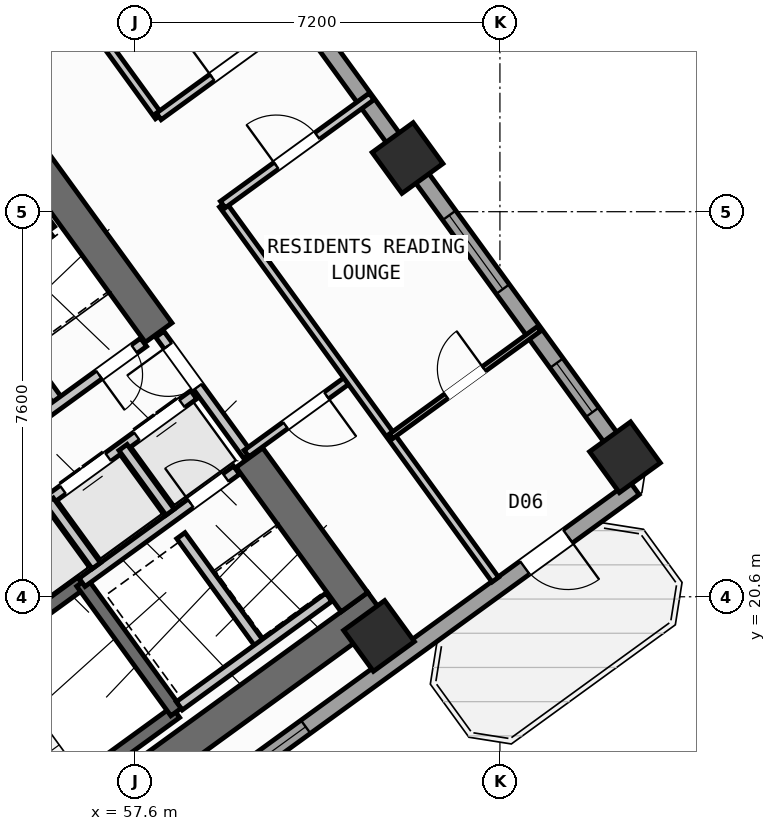
"""IFC4 building model, lengths in metres.
Left out: names, types, materials, properties, quantities, classifications, styles, units other than length and angle.
Written with IfcOpenShell. Run it as: python <this file> out.ifc"""

import sys

from ifc_helpers import new_model, si_unit, direction, frame, frame_2d, origin, origin_2d, place, context, subcontext, project, spatial, rectangle, hollow_rectangle, extrude, source, transform, mapped, element, fill, save


model = new_model("IFC4")
c1 = context("Model", 3, precision=1e-05, world=origin(), true_north=direction((0.0, 1.0)))
c2 = subcontext(c1, "Body", "Model", "MODEL_VIEW")
j1 = project(units=[si_unit("LENGTHUNIT", "METRE"), si_unit("PLANEANGLEUNIT", "RADIAN")], contexts=[c1])
p1 = place(None, origin())
s1 = spatial("IfcSite", under=j1, at=p1, CompositionType="ELEMENT")
p2 = place(p1, origin())
s2 = spatial("IfcBuilding", under=s1, at=p2, CompositionType="ELEMENT")
p3 = place(p2, frame((0.0, 0.0, 71.7)))
s3 = spatial("IfcBuildingStorey", under=s2, at=p3, CompositionType="ELEMENT", Elevation=71.7)
p4 = place(p3, frame((52.318, 13.11, 0.0), z_axis=(0.0, 0.0, 1.0), x_axis=(0.809019445368, 0.587781878776, 0.0)))
e1 = element("IfcWall", 1, at=p4, inside=s3, PredefinedType="SHEAR", context=c2, shape_type="SweptSolid", body=[
    extrude(rectangle(XDim=12.44, YDim=0.65, at=frame_2d((6.22, 0.0))), origin(), (0.0, 0.0, 1.0), 4.52),
])
p5 = place(p3, frame((61.929, 20.494, 0.0), z_axis=(0.0, 0.0, 1.0), x_axis=(-0.58782982593, 0.808984607855, 0.0)))
e2 = element("IfcWall", 2, at=p5, inside=s3, PredefinedType="SHEAR", context=c2, shape_type="SweptSolid", body=[
    extrude(rectangle(XDim=3.525, YDim=0.65, at=frame_2d((1.762, 0.0))), origin(), (0.0, 0.0, 1.0), 4.52),
])
p6 = place(p3, frame((58.064, 25.813, 0.0), z_axis=(0.0, 0.0, 1.0), x_axis=(-0.58777996584, 0.809020835181, 0.0)))
e3 = element("IfcWall", 3, at=p6, inside=s3, PredefinedType="SHEAR", context=c2, shape_type="SweptSolid", body=[
    extrude(rectangle(XDim=6.375, YDim=0.65, at=frame_2d((3.188, 0.0))), origin(), (0.0, 0.0, 1.0), 4.52),
])
m1 = source(origin(), c2, "Body", "SweptSolid", [
    extrude(hollow_rectangle(XDim=1.0, YDim=1.0, WallThickness=0.04, at=origin_2d()), origin(), (0.0, 0.0, 1.0), 4.8),
])
for number, where, z_axis, x_axis in (
    (4, (62.414, 19.827, 0.0), (0.0, 0.0, 1.0), (0.809, 0.588, 0.0)),
    (5, (67.268, 23.354, 0.0), (0.0, 0.0, 1.0), (0.809, 0.588, 0.0)),
    (6, (62.977, 29.259, 0.0), (0.0, 0.0, 1.0), (0.809, 0.588, 0.0)),
):
    element("IfcColumn", number, at=place(p3, frame(where, z_axis=z_axis, x_axis=x_axis)), inside=s3, PredefinedType="COLUMN", context=c2, shape_type="MappedRepresentation", body=[
        mapped(m1, transform((0.0, 0.0, 0.0), scale=1.0)),
    ])
p7 = place(p3, frame((54.81, 40.5, 0.0), z_axis=(0.0, 0.0, 1.0), x_axis=(0.587783625747, -0.809018176127, 0.0)))
e7 = element("IfcWall", 7, at=p7, inside=s3, PredefinedType="STANDARD", context=c2, shape_type="SweptSolid", body=[
    extrude(rectangle(XDim=21.587, YDim=0.32, at=frame_2d((10.794, 0.0))), origin(), (0.0, 0.0, 1.0), 3.895),
])
p8 = place(p7, frame((7.729, 0.0, 0.85)))
e8 = element("IfcOpeningElement", 8, at=p8, cuts=e7, PredefinedType="OPENING", context=c2, shape_type="SweptSolid", body=[
    extrude(rectangle(XDim=1.8, YDim=1.5, at=frame_2d((0.9, 0.75))), frame((0.0, 0.17, 0.0), z_axis=(0.0, -1.0, 0.0), x_axis=(1.0, 0.0, 0.0)), (0.0, 0.0, 1.0), 0.34),
])
p9 = place(p7, frame((15.292, 0.0, 0.85)))
e9 = element("IfcOpeningElement", 9, at=p9, cuts=e7, PredefinedType="OPENING", context=c2, shape_type="SweptSolid", body=[
    extrude(rectangle(XDim=1.8, YDim=1.5, at=frame_2d((0.9, 0.75))), frame((0.0, 0.17, 0.0), z_axis=(0.0, -1.0, 0.0), x_axis=(1.0, 0.0, 0.0)), (0.0, 0.0, 1.0), 0.34),
])
p10 = place(p7, frame((18.897, 0.0, 0.95)))
e10 = element("IfcOpeningElement", 10, at=p10, cuts=e7, PredefinedType="OPENING", context=c2, shape_type="SweptSolid", body=[
    extrude(rectangle(XDim=1.2, YDim=1.4, at=frame_2d((0.6, 0.7))), frame((0.0, 0.17, 0.0), z_axis=(0.0, -1.0, 0.0), x_axis=(1.0, 0.0, 0.0)), (0.0, 0.0, 1.0), 0.34),
])
p11 = place(p3, frame((67.454, 22.747, 0.0), z_axis=(0.0, 0.0, 1.0), x_axis=(-0.809021120468, -0.587779573171, 0.0)))
e11 = element("IfcWall", 11, at=p11, inside=s3, PredefinedType="STANDARD", context=c2, shape_type="SweptSolid", body=[
    extrude(rectangle(XDim=17.588, YDim=0.32, at=frame_2d((8.794, 0.0))), origin(), (0.0, 0.0, 1.0), 4.52),
])
p12 = place(p11, frame((1.624, 0.0, 0.0)))
e12 = element("IfcOpeningElement", 12, at=p12, cuts=e11, PredefinedType="OPENING", context=c2, shape_type="SweptSolid", body=[
    extrude(rectangle(XDim=1.05, YDim=2.15, at=frame_2d((0.525, 1.075))), frame((0.0, 0.17, 0.0), z_axis=(0.0, -1.0, 0.0), x_axis=(1.0, 0.0, 0.0)), (0.0, 0.0, 1.0), 0.34),
])
p13 = place(p11, frame((8.019, 0.0, 0.75)))
e13 = element("IfcOpeningElement", 13, at=p13, cuts=e11, PredefinedType="OPENING", context=c2, shape_type="SweptSolid", body=[
    extrude(rectangle(XDim=2.4, YDim=1.6, at=frame_2d((1.2, 0.8))), frame((0.0, 0.17, 0.0), z_axis=(0.0, -1.0, 0.0), x_axis=(1.0, 0.0, 0.0)), (0.0, 0.0, 1.0), 0.34),
])
p14 = place(p11, frame((13.169, 0.0, 0.75)))
e14 = element("IfcOpeningElement", 14, at=p14, cuts=e11, PredefinedType="OPENING", context=c2, shape_type="SweptSolid", body=[
    extrude(rectangle(XDim=2.4, YDim=1.6, at=frame_2d((1.2, 0.8))), frame((0.0, 0.17, 0.0), z_axis=(0.0, -1.0, 0.0), x_axis=(1.0, 0.0, 0.0)), (0.0, 0.0, 1.0), 0.34),
])
p15 = place(p3, frame((49.863, 23.44, 0.0), z_axis=(0.0, 0.0, 1.0), x_axis=(0.809003474932, 0.587803859759, 0.0)))
e15 = element("IfcWall", 15, at=p15, inside=s3, PredefinedType="SHEAR", context=c2, shape_type="SweptSolid", body=[
    extrude(rectangle(XDim=7.46, YDim=0.26, at=frame_2d((3.73, 0.0))), origin(), (0.0, 0.0, 1.0), 4.52),
])
p16 = place(p15, frame((0.36, 0.0, 0.0)))
e16 = element("IfcOpeningElement", 16, at=p16, cuts=e15, PredefinedType="OPENING", context=c2, shape_type="SweptSolid", body=[
    extrude(rectangle(XDim=0.86, YDim=2.05, at=frame_2d((0.43, 1.025))), frame((0.0, 0.14, 0.0), z_axis=(0.0, -1.0, 0.0), x_axis=(1.0, 0.0, 0.0)), (0.0, 0.0, 1.0), 0.28),
])
p17 = place(p3, frame((55.906, 27.831, 0.0), z_axis=(0.0, 0.0, 1.0), x_axis=(-0.587804123638, 0.809003283204, 0.0)))
e17 = element("IfcWall", 17, at=p17, inside=s3, PredefinedType="SHEAR", context=c2, shape_type="SweptSolid", body=[
    extrude(rectangle(XDim=3.16, YDim=0.26, at=frame_2d((1.58, 0.0))), origin(), (0.0, 0.0, 1.0), 4.52),
])
p18 = place(p3, frame((52.472, 14.013, 0.0), z_axis=(0.0, 0.0, 1.0), x_axis=(0.809028366311, 0.587769599847, 0.0)))
e18 = element("IfcWall", 18, at=p18, inside=s3, PredefinedType="SHEAR", context=c2, shape_type="SweptSolid", body=[
    extrude(rectangle(XDim=7.33, YDim=0.26, at=frame_2d((3.665, 0.0))), origin(), (0.0, 0.0, 1.0), 4.52),
])
p19 = place(p3, frame((50.615, 16.57, 0.0), z_axis=(0.0, 0.0, 1.0), x_axis=(0.809028366311, 0.587769599847, 0.0)))
e19 = element("IfcWall", 19, at=p19, inside=s3, PredefinedType="SHEAR", context=c2, shape_type="SweptSolid", body=[
    extrude(rectangle(XDim=7.33, YDim=0.26, at=frame_2d((3.665, 0.0))), origin(), (0.0, 0.0, 1.0), 4.52),
])
p20 = place(p19, frame((0.22, 0.0, 0.0)))
e20 = element("IfcOpeningElement", 20, at=p20, cuts=e19, PredefinedType="OPENING", context=c2, shape_type="SweptSolid", body=[
    extrude(rectangle(XDim=1.1, YDim=2.1, at=frame_2d((0.55, 1.05))), frame((0.0, 0.14, 0.0), z_axis=(0.0, -1.0, 0.0), x_axis=(1.0, 0.0, 0.0)), (0.0, 0.0, 1.0), 0.28),
])
p21 = place(p3, frame((58.41, 18.327, 0.0), z_axis=(0.0, 0.0, 1.0), x_axis=(-0.58776738483, 0.809029975545, 0.0)))
e21 = element("IfcWall", 21, at=p21, inside=s3, PredefinedType="SHEAR", context=c2, shape_type="SweptSolid", body=[
    extrude(rectangle(XDim=3.16, YDim=0.26, at=frame_2d((1.58, 0.0))), origin(), (0.0, 0.0, 1.0), 4.52),
])
p22 = place(p3, frame((56.553, 20.884, 0.0), z_axis=(0.0, 0.0, 1.0), x_axis=(0.809035789462, 0.587759382205, 0.0)))
e22 = element("IfcWall", 22, at=p22, inside=s3, PredefinedType="STANDARD", context=c2, shape_type="SweptSolid", body=[
    extrude(rectangle(XDim=3.768, YDim=0.2, at=frame_2d((1.884, 0.0))), origin(), (0.0, 0.0, 1.0), 4.51),
])
p23 = place(p22, frame((2.65, 0.0, 0.0)))
e23 = element("IfcOpeningElement", 23, at=p23, cuts=e22, PredefinedType="OPENING", context=c2, shape_type="SweptSolid", body=[
    extrude(rectangle(XDim=0.86, YDim=2.05, at=frame_2d((0.43, 1.025))), frame((0.0, 0.11, 0.0), z_axis=(0.0, -1.0, 0.0), x_axis=(1.0, 0.0, 0.0)), (0.0, 0.0, 1.0), 0.22),
])
p24 = place(p3, frame((54.421, 21.436, 0.0), z_axis=(0.0, 0.0, 1.0), x_axis=(0.809013710463, 0.587789772183, 0.0)))
e24 = element("IfcWall", 24, at=p24, inside=s3, PredefinedType="STANDARD", context=c2, shape_type="SweptSolid", body=[
    extrude(rectangle(XDim=5.36, YDim=0.2, at=frame_2d((2.68, 0.0))), origin(), (0.0, 0.0, 1.0), 4.51),
])
p25 = place(p24, frame((0.37, 0.0, 0.0)))
e25 = element("IfcOpeningElement", 25, at=p25, cuts=e24, PredefinedType="OPENING", context=c2, shape_type="SweptSolid", body=[
    extrude(rectangle(XDim=1.1, YDim=2.15, at=frame_2d((0.55, 1.075))), frame((0.0, 0.11, 0.0), z_axis=(0.0, -1.0, 0.0), x_axis=(1.0, 0.0, 0.0)), (0.0, 0.0, 1.0), 0.22),
])
p26 = place(p24, frame((2.17, 0.0, 0.0)))
e26 = element("IfcOpeningElement", 26, at=p26, cuts=e24, PredefinedType="OPENING", context=c2, shape_type="SweptSolid", body=[
    extrude(rectangle(XDim=1.1, YDim=2.15, at=frame_2d((0.55, 1.075))), frame((0.0, 0.11, 0.0), z_axis=(0.0, -1.0, 0.0), x_axis=(1.0, 0.0, 0.0)), (0.0, 0.0, 1.0), 0.22),
])
p27 = place(p24, frame((3.97, 0.0, 0.0)))
e27 = element("IfcOpeningElement", 27, at=p27, cuts=e24, PredefinedType="OPENING", context=c2, shape_type="SweptSolid", body=[
    extrude(rectangle(XDim=1.1, YDim=2.15, at=frame_2d((0.55, 1.075))), frame((0.0, 0.11, 0.0), z_axis=(0.0, -1.0, 0.0), x_axis=(1.0, 0.0, 0.0)), (0.0, 0.0, 1.0), 0.22),
])
p28 = place(p3, frame((56.834, 21.212, 0.0), z_axis=(0.0, 0.0, 1.0), x_axis=(-0.58776738483, 0.809029975545, 0.0)))
e28 = element("IfcWall", 28, at=p28, inside=s3, PredefinedType="STANDARD", context=c2, shape_type="SweptSolid", body=[
    extrude(rectangle(XDim=1.58, YDim=0.2, at=frame_2d((0.79, 0.0))), origin(), (0.0, 0.0, 1.0), 4.51),
])
p29 = place(p3, frame((58.29, 22.27, 0.0), z_axis=(0.0, 0.0, 1.0), x_axis=(-0.587840865826, 0.808976585857, 0.0)))
e29 = element("IfcWall", 29, at=p29, inside=s3, PredefinedType="STANDARD", context=c2, shape_type="SweptSolid", body=[
    extrude(rectangle(XDim=1.58, YDim=0.2, at=frame_2d((0.79, 0.0))), origin(), (0.0, 0.0, 1.0), 4.51),
])
p30 = place(p3, frame((60.067, 19.655, 0.0), z_axis=(0.0, 0.0, 1.0), x_axis=(-0.587800520745, 0.809005900975, 0.0)))
e30 = element("IfcWall", 30, at=p30, inside=s3, PredefinedType="STANDARD", context=c2, shape_type="SweptSolid", body=[
    extrude(rectangle(XDim=2.66, YDim=0.2, at=frame_2d((1.33, 0.0))), origin(), (0.0, 0.0, 1.0), 4.51),
])
p31 = place(p3, frame((58.472, 18.447, 0.0), z_axis=(0.0, 0.0, 1.0), x_axis=(0.809022487728, 0.587777691266, 0.0)))
e31 = element("IfcWall", 31, at=p31, inside=s3, PredefinedType="STANDARD", context=c2, shape_type="SweptSolid", body=[
    extrude(rectangle(XDim=3.648, YDim=0.2, at=frame_2d((1.824, 0.0))), origin(), (0.0, 0.0, 1.0), 4.51),
])
p32 = place(p3, frame((56.111, 24.419, 0.0), z_axis=(0.0, 0.0, 1.0), x_axis=(-0.58777848983, 0.809021907548, 0.0)))
e32 = element("IfcWall", 32, at=p32, inside=s3, PredefinedType="STANDARD", context=c2, shape_type="SweptSolid", body=[
    extrude(rectangle(XDim=2.88, YDim=0.2, at=frame_2d((1.44, 0.0))), origin(), (0.0, 0.0, 1.0), 4.51),
])
p33 = place(p3, frame((53.425, 22.468, 0.0), z_axis=(0.0, 0.0, 1.0), x_axis=(0.80902705128, 0.587771409902, 0.0)))
e33 = element("IfcWall", 33, at=p33, inside=s3, PredefinedType="STANDARD", context=c2, shape_type="SweptSolid", body=[
    extrude(rectangle(XDim=5.368, YDim=0.2, at=frame_2d((2.684, 0.0))), origin(), (0.0, 0.0, 1.0), 4.51),
])
p34 = place(p33, frame((4.28, 0.0, 0.0)))
e34 = element("IfcOpeningElement", 34, at=p34, cuts=e33, PredefinedType="OPENING", context=c2, shape_type="SweptSolid", body=[
    extrude(rectangle(XDim=0.86, YDim=2.05, at=frame_2d((0.43, 1.025))), frame((0.0, 0.11, 0.0), z_axis=(0.0, -1.0, 0.0), x_axis=(1.0, 0.0, 0.0)), (0.0, 0.0, 1.0), 0.22),
])
p35 = place(p33, frame((1.45, 0.0, 0.0)))
e35 = element("IfcOpeningElement", 35, at=p35, cuts=e33, PredefinedType="OPENING", context=c2, shape_type="SweptSolid", body=[
    extrude(rectangle(XDim=0.86, YDim=2.05, at=frame_2d((0.43, 1.025))), frame((0.0, 0.11, 0.0), z_axis=(0.0, -1.0, 0.0), x_axis=(1.0, 0.0, 0.0)), (0.0, 0.0, 1.0), 0.22),
])
p36 = place(p3, frame((59.827, 23.386, 0.0), z_axis=(0.0, 0.0, 1.0), x_axis=(-0.587803840107, 0.809003489211, 0.0)))
e36 = element("IfcWall", 36, at=p36, inside=s3, PredefinedType="STANDARD", context=c2, shape_type="SweptSolid", body=[
    extrude(rectangle(XDim=2.96, YDim=0.2, at=frame_2d((1.48, 0.0))), origin(), (0.0, 0.0, 1.0), 4.51),
])
p37 = place(p36, frame((1.68, 0.0, 0.0)))
e37 = element("IfcOpeningElement", 37, at=p37, cuts=e36, PredefinedType="OPENING", context=c2, shape_type="SweptSolid", body=[
    extrude(rectangle(XDim=1.0, YDim=2.1, at=frame_2d((0.5, 1.05))), frame((0.0, 0.11, 0.0), z_axis=(0.0, -1.0, 0.0), x_axis=(1.0, 0.0, 0.0)), (0.0, 0.0, 1.0), 0.22),
])
p38 = place(p3, frame((59.798, 23.427, 0.0), z_axis=(0.0, 0.0, 1.0), x_axis=(0.809034604122, 0.587761013791, 0.0)))
e38 = element("IfcWall", 38, at=p38, inside=s3, PredefinedType="PARTITIONING", context=c2, shape_type="SweptSolid", body=[
    extrude(rectangle(XDim=2.51, YDim=0.16, at=frame_2d((1.255, 0.0))), origin(), (0.0, 0.0, 1.0), 4.51),
])
p39 = place(p38, frame((0.95, 0.0, 0.0)))
e39 = element("IfcOpeningElement", 39, at=p39, cuts=e38, PredefinedType="OPENING", context=c2, shape_type="SweptSolid", body=[
    extrude(rectangle(XDim=1.0, YDim=2.1, at=frame_2d((0.5, 1.05))), frame((0.0, 0.09, 0.0), z_axis=(0.0, -1.0, 0.0), x_axis=(1.0, 0.0, 0.0)), (0.0, 0.0, 1.0), 0.18),
])
p40 = place(p3, frame((64.709, 20.938, 0.0), z_axis=(0.0, 0.0, 1.0), x_axis=(-0.587776590479, 0.80902328748, 0.0)))
e40 = element("IfcWall", 40, at=p40, inside=s3, PredefinedType="PARTITIONING", context=c2, shape_type="SweptSolid", body=[
    extrude(rectangle(XDim=9.15, YDim=0.16, at=frame_2d((4.575, 0.0))), origin(), (0.0, 0.0, 1.0), 4.51),
])
p41 = place(p3, frame((58.067, 30.08, 0.0), z_axis=(0.0, 0.0, 1.0), x_axis=(-0.587787785243, 0.809015154073, 0.0)))
e41 = element("IfcWall", 41, at=p41, inside=s3, PredefinedType="PARTITIONING", context=c2, shape_type="SweptSolid", body=[
    extrude(rectangle(XDim=10.4, YDim=0.16, at=frame_2d((5.2, 0.0))), origin(), (0.0, 0.0, 1.0), 4.51),
])
p42 = place(p3, frame((59.331, 28.341, 0.0), z_axis=(0.0, 0.0, 1.0), x_axis=(0.809003564202, 0.587803736896, 0.0)))
e42 = element("IfcWall", 42, at=p42, inside=s3, PredefinedType="PARTITIONING", context=c2, shape_type="SweptSolid", body=[
    extrude(rectangle(XDim=3.63, YDim=0.16, at=frame_2d((1.815, 0.0))), origin(), (0.0, 0.0, 1.0), 4.51),
])
p43 = place(p42, frame((1.305, 0.0, 0.0)))
e43 = element("IfcOpeningElement", 43, at=p43, cuts=e42, PredefinedType="OPENING", context=c2, shape_type="SweptSolid", body=[
    extrude(rectangle(XDim=1.0, YDim=2.1, at=frame_2d((0.5, 1.05))), frame((0.0, 0.09, 0.0), z_axis=(0.0, -1.0, 0.0), x_axis=(1.0, 0.0, 0.0)), (0.0, 0.0, 1.0), 0.18),
])
p44 = place(p3, frame((58.067, 30.08, 0.0), z_axis=(0.0, 0.0, 1.0), x_axis=(0.809012309495, 0.587791700422, 0.0)))
e44 = element("IfcWall", 44, at=p44, inside=s3, PredefinedType="PARTITIONING", context=c2, shape_type="SweptSolid", body=[
    extrude(rectangle(XDim=3.63, YDim=0.16, at=frame_2d((1.815, 0.0))), origin(), (0.0, 0.0, 1.0), 4.51),
])
p45 = place(p44, frame((1.305, 0.0, 0.0)))
e45 = element("IfcOpeningElement", 45, at=p45, cuts=e44, PredefinedType="OPENING", context=c2, shape_type="SweptSolid", body=[
    extrude(rectangle(XDim=1.0, YDim=2.1, at=frame_2d((0.5, 1.05))), frame((0.0, 0.09, 0.0), z_axis=(0.0, -1.0, 0.0), x_axis=(1.0, 0.0, 0.0)), (0.0, 0.0, 1.0), 0.18),
])
p46 = place(p3, frame((62.653, 23.768, 0.0), z_axis=(0.0, 0.0, 1.0), x_axis=(0.809037198293, 0.58775744298, 0.0)))
e46 = element("IfcWall", 46, at=p46, inside=s3, PredefinedType="PARTITIONING", context=c2, shape_type="SweptSolid", body=[
    extrude(rectangle(XDim=3.61, YDim=0.11, at=frame_2d((1.805, 0.0))), origin(), (0.0, 0.0, 1.0), 4.51),
])
p47 = place(p46, frame((1.345, 0.0, 0.0)))
e47 = element("IfcOpeningElement", 47, at=p47, cuts=e46, PredefinedType="OPENING", context=c2, shape_type="SweptSolid", body=[
    extrude(rectangle(XDim=0.92, YDim=2.08, at=frame_2d((0.46, 1.04))), frame((0.0, 0.065, 0.0), z_axis=(0.0, -1.0, 0.0), x_axis=(1.0, 0.0, 0.0)), (0.0, 0.0, 1.0), 0.13),
])
m2 = source(origin(), c2, "Body", "SweptSolid", [
    extrude(rectangle(XDim=1.05, YDim=2.15, at=frame_2d((0.525, 1.075))), frame((0.0, 0.025, 0.0), z_axis=(0.0, -1.0, 0.0), x_axis=(1.0, 0.0, 0.0)), (0.0, 0.0, 1.0), 0.05),
])
p48 = place(p12, origin())
e48 = element("IfcDoor", 48, at=p48, inside=s3, OperationType="SINGLE_SWING_LEFT", PredefinedType="DOOR", context=c2, shape_type="MappedRepresentation", body=[
    mapped(m2, transform((0.0, 0.0, 0.0), scale=1.0)),
])
fill(e12, e48)
m3 = source(origin(), c2, "Body", "SweptSolid", [
    extrude(rectangle(XDim=1.8, YDim=1.5, at=frame_2d((0.9, 0.75))), frame((0.0, 0.03, 0.0), z_axis=(0.0, -1.0, 0.0), x_axis=(1.0, 0.0, 0.0)), (0.0, 0.0, 1.0), 0.06),
])
p49 = place(p9, origin())
e49 = element("IfcWindow", 49, at=p49, inside=s3, PartitioningType="SINGLE_PANEL", PredefinedType="WINDOW", context=c2, shape_type="MappedRepresentation", body=[
    mapped(m3, transform((0.0, 0.0, 0.0), scale=1.0)),
])
fill(e9, e49)
m4 = source(origin(), c2, "Body", "SweptSolid", [
    extrude(rectangle(XDim=1.2, YDim=1.4, at=frame_2d((0.6, 0.7))), frame((0.0, 0.03, 0.0), z_axis=(0.0, -1.0, 0.0), x_axis=(1.0, 0.0, 0.0)), (0.0, 0.0, 1.0), 0.06),
])
p50 = place(p10, origin())
e50 = element("IfcWindow", 50, at=p50, inside=s3, PartitioningType="SINGLE_PANEL", PredefinedType="WINDOW", context=c2, shape_type="MappedRepresentation", body=[
    mapped(m4, transform((0.0, 0.0, 0.0), scale=1.0)),
])
fill(e10, e50)
m5 = source(origin(), c2, "Body", "SweptSolid", [
    extrude(rectangle(XDim=2.4, YDim=1.6, at=frame_2d((1.2, 0.8))), frame((0.0, 0.03, 0.0), z_axis=(0.0, -1.0, 0.0), x_axis=(1.0, 0.0, 0.0)), (0.0, 0.0, 1.0), 0.06),
])
p51 = place(p13, origin())
e51 = element("IfcWindow", 51, at=p51, inside=s3, PartitioningType="SINGLE_PANEL", PredefinedType="WINDOW", context=c2, shape_type="MappedRepresentation", body=[
    mapped(m5, transform((0.0, 0.0, 0.0), scale=1.0)),
])
fill(e13, e51)
m6 = source(origin(), c2, "Body", "SweptSolid", [
    extrude(rectangle(XDim=1.1, YDim=2.15, at=frame_2d((0.55, 1.075))), frame((0.0, 0.025, 0.0), z_axis=(0.0, -1.0, 0.0), x_axis=(1.0, 0.0, 0.0)), (0.0, 0.0, 1.0), 0.05),
])
p52 = place(p26, origin())
e52 = element("IfcDoor", 52, at=p52, inside=s3, OperationType="DOUBLE_DOOR_SLIDING", PredefinedType="DOOR", context=c2, shape_type="MappedRepresentation", body=[
    mapped(m6, transform((0.0, 0.0, 0.0), scale=1.0)),
])
fill(e26, e52)
p53 = place(p27, origin())
e53 = element("IfcDoor", 53, at=p53, inside=s3, OperationType="DOUBLE_DOOR_SLIDING", PredefinedType="DOOR", context=c2, shape_type="MappedRepresentation", body=[
    mapped(m6, transform((0.0, 0.0, 0.0), scale=1.0)),
])
fill(e27, e53)
m7 = source(origin(), c2, "Body", "SweptSolid", [
    extrude(rectangle(XDim=0.86, YDim=2.05, at=frame_2d((0.43, 1.025))), frame((0.0, 0.025, 0.0), z_axis=(0.0, -1.0, 0.0), x_axis=(1.0, 0.0, 0.0)), (0.0, 0.0, 1.0), 0.05),
])
p54 = place(p23, origin())
e54 = element("IfcDoor", 54, at=p54, inside=s3, OperationType="SINGLE_SWING_LEFT", PredefinedType="DOOR", context=c2, shape_type="MappedRepresentation", body=[
    mapped(m7, transform((0.0, 0.0, 0.0), scale=1.0)),
])
fill(e23, e54)
p55 = place(p34, frame((0.86, 0.0, 0.0), z_axis=(0.0, 0.0, 1.0), x_axis=(-1.0, 0.0, 0.0)))
e55 = element("IfcDoor", 55, at=p55, inside=s3, OperationType="SINGLE_SWING_RIGHT", PredefinedType="DOOR", context=c2, shape_type="MappedRepresentation", body=[
    mapped(m7, transform((0.0, 0.0, 0.0), scale=1.0)),
])
fill(e34, e55)
m8 = source(origin(), c2, "Body", "SweptSolid", [
    extrude(rectangle(XDim=1.0, YDim=2.1, at=frame_2d((0.5, 1.05))), frame((0.0, 0.025, 0.0), z_axis=(0.0, -1.0, 0.0), x_axis=(1.0, 0.0, 0.0)), (0.0, 0.0, 1.0), 0.05),
])
p56 = place(p39, frame((1.0, 0.0, 0.0), z_axis=(0.0, 0.0, 1.0), x_axis=(-1.0, 0.0, 0.0)))
e56 = element("IfcDoor", 56, at=p56, inside=s3, OperationType="SINGLE_SWING_LEFT", PredefinedType="DOOR", context=c2, shape_type="MappedRepresentation", body=[
    mapped(m8, transform((0.0, 0.0, 0.0), scale=1.0)),
])
fill(e39, e56)
p57 = place(p37, origin())
e57 = element("IfcDoor", 57, at=p57, inside=s3, OperationType="SINGLE_SWING_RIGHT", PredefinedType="DOOR", context=c2, shape_type="MappedRepresentation", body=[
    mapped(m8, transform((0.0, 0.0, 0.0), scale=1.0)),
])
fill(e37, e57)
p58 = place(p45, origin())
e58 = element("IfcDoor", 58, at=p58, inside=s3, OperationType="SINGLE_SWING_LEFT", PredefinedType="DOOR", context=c2, shape_type="MappedRepresentation", body=[
    mapped(m8, transform((0.0, 0.0, 0.0), scale=1.0)),
])
fill(e45, e58)
p59 = place(p43, origin())
e59 = element("IfcDoor", 59, at=p59, inside=s3, OperationType="SINGLE_SWING_LEFT", PredefinedType="DOOR", context=c2, shape_type="MappedRepresentation", body=[
    mapped(m8, transform((0.0, 0.0, 0.0), scale=1.0)),
])
fill(e43, e59)
m9 = source(origin(), c2, "Body", "SweptSolid", [
    extrude(rectangle(XDim=0.92, YDim=2.08, at=frame_2d((0.46, 1.04))), frame((0.0, 0.025, 0.0), z_axis=(0.0, -1.0, 0.0), x_axis=(1.0, 0.0, 0.0)), (0.0, 0.0, 1.0), 0.05),
])
p60 = place(p47, origin())
e60 = element("IfcDoor", 60, at=p60, inside=s3, OperationType="SINGLE_SWING_RIGHT", PredefinedType="DOOR", context=c2, shape_type="MappedRepresentation", body=[
    mapped(m9, transform((0.0, 0.0, 0.0), scale=1.0)),
])
fill(e47, e60)
save(model, sys.argv[1])
